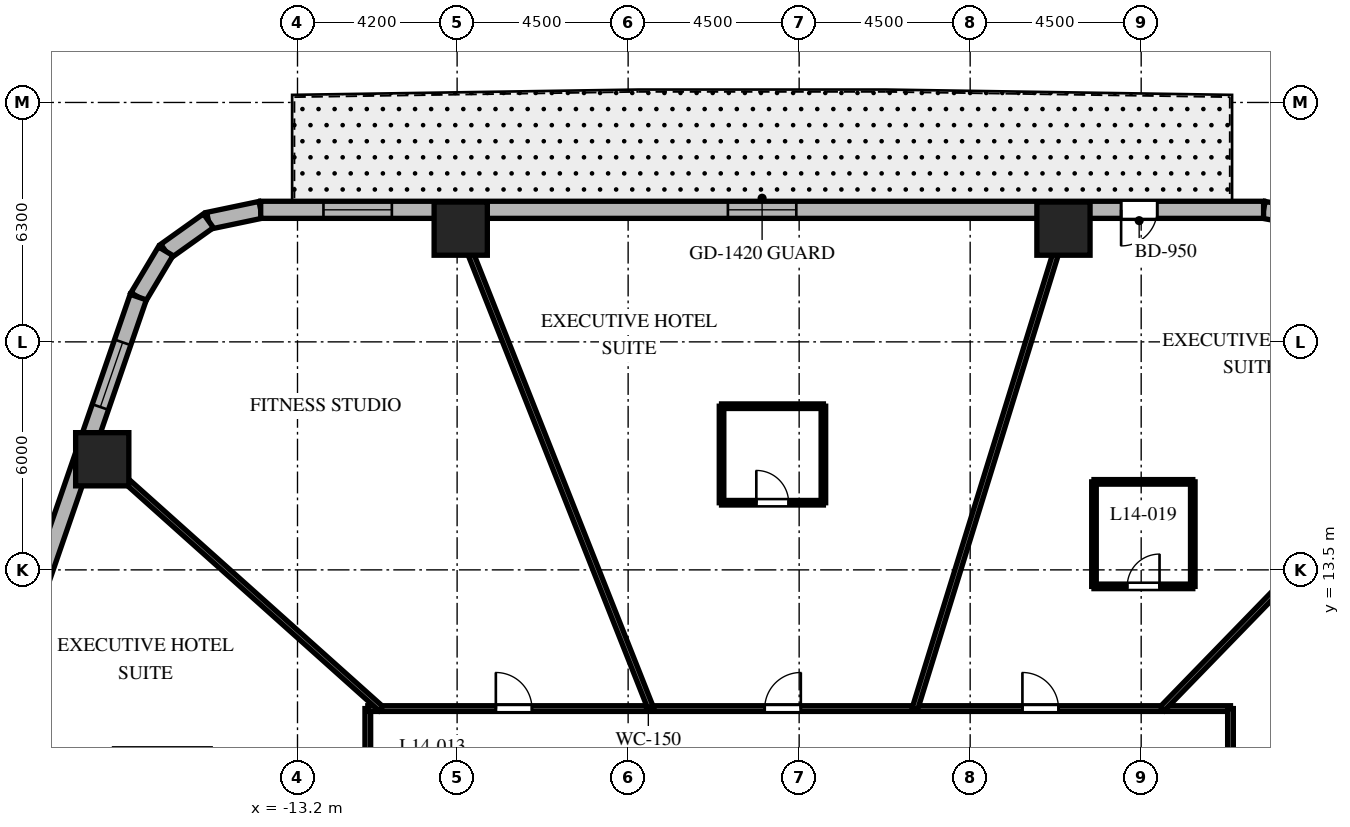
"""IFC4 building model, lengths in metres.
Left out: names, types, materials, properties, quantities, classifications, styles, units other than length and angle.
Written with IfcOpenShell. Run it as: python <this file> out.ifc"""

import sys

from ifc_helpers import new_model, si_unit, direction, frame, frame_2d, origin, origin_2d, place, context, subcontext, project, spatial, rectangle, extrude, element, fill, save


model = new_model("IFC4")
c1 = context("Model", 3, precision=1e-05, world=origin(), true_north=direction((0.0, 1.0)))
c2 = subcontext(c1, "Body", "Model", "MODEL_VIEW")
j1 = project(units=[si_unit("LENGTHUNIT", "METRE"), si_unit("PLANEANGLEUNIT", "RADIAN")], contexts=[c1])
p1 = place(None, origin())
s1 = spatial("IfcSite", under=j1, at=p1, CompositionType="ELEMENT")
p2 = place(p1, origin())
s2 = spatial("IfcBuilding", under=s1, at=p2, CompositionType="ELEMENT")
p3 = place(p2, frame((0.0, 0.0, 63.8)))
s3 = spatial("IfcBuildingStorey", under=s2, at=p3, CompositionType="ELEMENT", Elevation=63.8)
for number, where, z_axis, x_axis in (
    (1, (6.955, 22.48, 0.0), (0.0, 0.0, 1.0), (1.0, 0.0, 0.0)),
    (2, (-8.905, 22.48, 0.0), (0.0, 0.0, 1.0), (1.0, 0.0, 0.0)),
    (3, (-18.338, 16.411, 0.0), (0.0, 0.0, 1.0), (1.0, 0.0, 0.0)),
):
    element("IfcColumn", number, at=place(p3, frame(where, z_axis=z_axis, x_axis=x_axis)), inside=s3, PredefinedType="COLUMN", context=c2, shape_type="SweptSolid", body=[
        extrude(rectangle(XDim=1.4, YDim=1.4, at=origin_2d()), origin(), (0.0, 0.0, 1.0), 3.7),
    ])
p4 = place(p3, frame((13.468, 22.74, 0.0), z_axis=(0.0, 0.0, 1.0), x_axis=(-0.982717174228, 0.185113358451, 0.0)))
e4 = element("IfcWall", 4, at=p4, inside=s3, PredefinedType="SOLIDWALL", context=c2, shape_type="SweptSolid", body=[
    extrude(rectangle(XDim=1.269, YDim=0.45, at=frame_2d((0.634, 0.0))), origin(), (0.0, 0.0, 1.0), 3.4),
])
p5 = place(p3, frame((-14.168, 22.975, 0.0), z_axis=(0.0, 0.0, 1.0), x_axis=(-0.978770371074, -0.204959900243, 0.0)))
e5 = element("IfcWall", 5, at=p5, inside=s3, PredefinedType="SOLIDWALL", context=c2, shape_type="SweptSolid", body=[
    extrude(rectangle(XDim=1.406, YDim=0.45, at=frame_2d((0.703, 0.0))), origin(), (0.0, 0.0, 1.0), 3.4),
])
p6 = place(p3, frame((-15.544, 22.687, 0.0), z_axis=(0.0, 0.0, 1.0), x_axis=(-0.814210854316, -0.580569276412, 0.0)))
e6 = element("IfcWall", 6, at=p6, inside=s3, PredefinedType="SOLIDWALL", context=c2, shape_type="SweptSolid", body=[
    extrude(rectangle(XDim=1.381, YDim=0.45, at=frame_2d((0.691, 0.0))), origin(), (0.0, 0.0, 1.0), 3.4),
])
p7 = place(p3, frame((-16.669, 21.885, 0.0), z_axis=(0.0, 0.0, 1.0), x_axis=(-0.512936712947, -0.858426425799, 0.0)))
e7 = element("IfcWall", 7, at=p7, inside=s3, PredefinedType="SOLIDWALL", context=c2, shape_type="SweptSolid", body=[
    extrude(rectangle(XDim=1.406, YDim=0.45, at=frame_2d((0.703, 0.0))), origin(), (0.0, 0.0, 1.0), 3.4),
])
p8 = place(p3, frame((12.221, 22.975, 0.0), z_axis=(0.0, 0.0, 1.0), x_axis=(-1.0, 0.0, 0.0)))
e8 = element("IfcWall", 8, at=p8, inside=s3, PredefinedType="SOLIDWALL", context=c2, shape_type="SweptSolid", body=[
    extrude(rectangle(XDim=26.389, YDim=0.45, at=frame_2d((13.195, 0.0))), origin(), (0.0, 0.0, 1.0), 3.4),
])
p9 = place(p8, frame((2.799, 0.0, 0.0)))
e9 = element("IfcOpeningElement", 9, at=p9, cuts=e8, PredefinedType="OPENING", context=c2, shape_type="SweptSolid", body=[
    extrude(rectangle(XDim=0.95, YDim=2.15, at=frame_2d((0.475, 1.075))), frame((0.0, 0.235, 0.0), z_axis=(0.0, -1.0, 0.0), x_axis=(1.0, 0.0, 0.0)), (0.0, 0.0, 1.0), 0.47),
])
p10 = place(p8, frame((12.296, 0.0, 0.8)))
e10 = element("IfcOpeningElement", 10, at=p10, cuts=e8, PredefinedType="OPENING", context=c2, shape_type="SweptSolid", body=[
    extrude(rectangle(XDim=1.8, YDim=1.8, at=frame_2d((0.9, 0.9))), frame((0.0, 0.235, 0.0), z_axis=(0.0, -1.0, 0.0), x_axis=(1.0, 0.0, 0.0)), (0.0, 0.0, 1.0), 0.47),
])
p11 = place(p8, frame((22.938, 0.0, 0.8)))
e11 = element("IfcOpeningElement", 11, at=p11, cuts=e8, PredefinedType="OPENING", context=c2, shape_type="SweptSolid", body=[
    extrude(rectangle(XDim=1.8, YDim=1.8, at=frame_2d((0.9, 0.9))), frame((0.0, 0.235, 0.0), z_axis=(0.0, -1.0, 0.0), x_axis=(1.0, 0.0, 0.0)), (0.0, 0.0, 1.0), 0.47),
])
p12 = place(p3, frame((-17.39, 20.678, 0.0), z_axis=(0.0, 0.0, 1.0), x_axis=(-0.326068018294, -0.945346310854, 0.0)))
e12 = element("IfcWall", 12, at=p12, inside=s3, PredefinedType="SOLIDWALL", context=c2, shape_type="SweptSolid", body=[
    extrude(rectangle(XDim=21.793, YDim=0.45, at=frame_2d((10.896, 0.0))), origin(), (0.0, 0.0, 1.0), 3.4),
])
p13 = place(p12, frame((1.26, 0.0, 0.8)))
e13 = element("IfcOpeningElement", 13, at=p13, cuts=e12, PredefinedType="OPENING", context=c2, shape_type="SweptSolid", body=[
    extrude(rectangle(XDim=1.8, YDim=1.8, at=frame_2d((0.9, 0.9))), frame((0.0, 0.235, 0.0), z_axis=(0.0, -1.0, 0.0), x_axis=(1.0, 0.0, 0.0)), (0.0, 0.0, 1.0), 0.47),
])
p14 = place(p12, frame((9.943, 0.0, 0.8)))
e14 = element("IfcOpeningElement", 14, at=p14, cuts=e12, PredefinedType="OPENING", context=c2, shape_type="SweptSolid", body=[
    extrude(rectangle(XDim=1.8, YDim=1.8, at=frame_2d((0.9, 0.9))), frame((0.0, 0.235, 0.0), z_axis=(0.0, -1.0, 0.0), x_axis=(1.0, 0.0, 0.0)), (0.0, 0.0, 1.0), 0.47),
])
p15 = place(p12, frame((18.68, 0.0, 0.8)))
e15 = element("IfcOpeningElement", 15, at=p15, cuts=e12, PredefinedType="OPENING", context=c2, shape_type="SweptSolid", body=[
    extrude(rectangle(XDim=1.8, YDim=1.8, at=frame_2d((0.9, 0.9))), frame((0.0, 0.235, 0.0), z_axis=(0.0, -1.0, 0.0), x_axis=(1.0, 0.0, 0.0)), (0.0, 0.0, 1.0), 0.47),
])
p16 = place(p3, frame((-11.35, -9.85, 0.0), z_axis=(0.0, 0.0, 1.0), x_axis=(0.0, 1.0, 0.0)))
e16 = element("IfcWall", 16, at=p16, inside=s3, PredefinedType="PARTITIONING", context=c2, shape_type="SweptSolid", body=[
    extrude(rectangle(XDim=19.7, YDim=0.15, at=frame_2d((9.85, 0.0))), origin(), (0.0, 0.0, 1.0), 2.84),
])
p17 = place(p16, frame((15.191, 0.0, 0.0)))
e17 = element("IfcOpeningElement", 17, at=p17, cuts=e16, PredefinedType="OPENING", context=c2, shape_type="SweptSolid", body=[
    extrude(rectangle(XDim=0.95, YDim=2.03, at=frame_2d((0.475, 1.015))), frame((0.0, 0.085, 0.0), z_axis=(0.0, -1.0, 0.0), x_axis=(1.0, 0.0, 0.0)), (0.0, 0.0, 1.0), 0.17),
])
p18 = place(p16, frame((8.838, 0.0, 0.0)))
e18 = element("IfcOpeningElement", 18, at=p18, cuts=e16, PredefinedType="OPENING", context=c2, shape_type="SweptSolid", body=[
    extrude(rectangle(XDim=0.95, YDim=2.03, at=frame_2d((0.475, 1.015))), frame((0.0, 0.085, 0.0), z_axis=(0.0, -1.0, 0.0), x_axis=(1.0, 0.0, 0.0)), (0.0, 0.0, 1.0), 0.17),
])
p19 = place(p16, frame((4.704, 0.0, 0.0)))
e19 = element("IfcOpeningElement", 19, at=p19, cuts=e16, PredefinedType="OPENING", context=c2, shape_type="SweptSolid", body=[
    extrude(rectangle(XDim=0.95, YDim=2.03, at=frame_2d((0.475, 1.015))), frame((0.0, 0.085, 0.0), z_axis=(0.0, -1.0, 0.0), x_axis=(1.0, 0.0, 0.0)), (0.0, 0.0, 1.0), 0.17),
])
p20 = place(p16, frame((1.462, 0.0, 0.0)))
e20 = element("IfcOpeningElement", 20, at=p20, cuts=e16, PredefinedType="OPENING", context=c2, shape_type="SweptSolid", body=[
    extrude(rectangle(XDim=0.95, YDim=2.03, at=frame_2d((0.475, 1.015))), frame((0.0, 0.085, 0.0), z_axis=(0.0, -1.0, 0.0), x_axis=(1.0, 0.0, 0.0)), (0.0, 0.0, 1.0), 0.17),
])
p21 = place(p3, frame((-11.35, 9.85, 0.0), z_axis=(0.0, 0.0, 1.0), x_axis=(1.0, 0.0, 0.0)))
e21 = element("IfcWall", 21, at=p21, inside=s3, PredefinedType="PARTITIONING", context=c2, shape_type="SweptSolid", body=[
    extrude(rectangle(XDim=22.7, YDim=0.15, at=frame_2d((11.35, 0.0))), origin(), (0.0, 0.0, 1.0), 2.84),
])
p22 = place(p21, frame((17.225, 0.0, 0.0)))
e22 = element("IfcOpeningElement", 22, at=p22, cuts=e21, PredefinedType="OPENING", context=c2, shape_type="SweptSolid", body=[
    extrude(rectangle(XDim=0.95, YDim=2.03, at=frame_2d((0.475, 1.015))), frame((0.0, 0.085, 0.0), z_axis=(0.0, -1.0, 0.0), x_axis=(1.0, 0.0, 0.0)), (0.0, 0.0, 1.0), 0.17),
])
p23 = place(p21, frame((10.444, 0.0, 0.0)))
e23 = element("IfcOpeningElement", 23, at=p23, cuts=e21, PredefinedType="OPENING", context=c2, shape_type="SweptSolid", body=[
    extrude(rectangle(XDim=0.95, YDim=2.03, at=frame_2d((0.475, 1.015))), frame((0.0, 0.085, 0.0), z_axis=(0.0, -1.0, 0.0), x_axis=(1.0, 0.0, 0.0)), (0.0, 0.0, 1.0), 0.17),
])
p24 = place(p21, frame((3.369, 0.0, 0.0)))
e24 = element("IfcOpeningElement", 24, at=p24, cuts=e21, PredefinedType="OPENING", context=c2, shape_type="SweptSolid", body=[
    extrude(rectangle(XDim=0.95, YDim=2.03, at=frame_2d((0.475, 1.015))), frame((0.0, 0.085, 0.0), z_axis=(0.0, -1.0, 0.0), x_axis=(1.0, 0.0, 0.0)), (0.0, 0.0, 1.0), 0.17),
])
p25 = place(p3, frame((11.35, 9.85, 0.0), z_axis=(0.0, 0.0, 1.0), x_axis=(0.0, -1.0, 0.0)))
e25 = element("IfcWall", 25, at=p25, inside=s3, PredefinedType="PARTITIONING", context=c2, shape_type="SweptSolid", body=[
    extrude(rectangle(XDim=19.7, YDim=0.15, at=frame_2d((9.85, 0.0))), origin(), (0.0, 0.0, 1.0), 2.84),
])
p26 = place(p25, frame((4.704, 0.0, 0.0)))
e26 = element("IfcOpeningElement", 26, at=p26, cuts=e25, PredefinedType="OPENING", context=c2, shape_type="SweptSolid", body=[
    extrude(rectangle(XDim=0.95, YDim=2.03, at=frame_2d((0.475, 1.015))), frame((0.0, 0.085, 0.0), z_axis=(0.0, -1.0, 0.0), x_axis=(1.0, 0.0, 0.0)), (0.0, 0.0, 1.0), 0.17),
])
p27 = place(p25, frame((1.462, 0.0, 0.0)))
e27 = element("IfcOpeningElement", 27, at=p27, cuts=e25, PredefinedType="OPENING", context=c2, shape_type="SweptSolid", body=[
    extrude(rectangle(XDim=0.95, YDim=2.03, at=frame_2d((0.475, 1.015))), frame((0.0, 0.085, 0.0), z_axis=(0.0, -1.0, 0.0), x_axis=(1.0, 0.0, 0.0)), (0.0, 0.0, 1.0), 0.17),
])
p28 = place(p25, frame((15.191, 0.0, 0.0)))
e28 = element("IfcOpeningElement", 28, at=p28, cuts=e25, PredefinedType="OPENING", context=c2, shape_type="SweptSolid", body=[
    extrude(rectangle(XDim=0.95, YDim=2.03, at=frame_2d((0.475, 1.015))), frame((0.0, 0.085, 0.0), z_axis=(0.0, -1.0, 0.0), x_axis=(1.0, 0.0, 0.0)), (0.0, 0.0, 1.0), 0.17),
])
p29 = place(p25, frame((8.838, 0.0, 0.0)))
e29 = element("IfcOpeningElement", 29, at=p29, cuts=e25, PredefinedType="OPENING", context=c2, shape_type="SweptSolid", body=[
    extrude(rectangle(XDim=0.95, YDim=2.03, at=frame_2d((0.475, 1.015))), frame((0.0, 0.085, 0.0), z_axis=(0.0, -1.0, 0.0), x_axis=(1.0, 0.0, 0.0)), (0.0, 0.0, 1.0), 0.17),
])
p30 = place(p3, frame((11.35, 6.217, 0.0), z_axis=(0.0, 0.0, 1.0), x_axis=(0.877047587135, 0.480403507378, 0.0)))
e30 = element("IfcWall", 30, at=p30, inside=s3, PredefinedType="PARTITIONING", context=c2, shape_type="SweptSolid", body=[
    extrude(rectangle(XDim=10.062, YDim=0.15, at=frame_2d((5.031, 0.0))), origin(), (0.0, 0.0, 1.0), 2.54),
])
p31 = place(p3, frame((9.558, 9.85, 0.0), z_axis=(0.0, 0.0, 1.0), x_axis=(0.69638346089, 0.717669893056, 0.0)))
e31 = element("IfcWall", 31, at=p31, inside=s3, PredefinedType="PARTITIONING", context=c2, shape_type="SweptSolid", body=[
    extrude(rectangle(XDim=10.701, YDim=0.15, at=frame_2d((5.351, 0.0))), origin(), (0.0, 0.0, 1.0), 2.54),
])
p32 = place(p3, frame((3.048, 9.85, 0.0), z_axis=(0.0, 0.0, 1.0), x_axis=(0.295553992761, 0.955326037206, 0.0)))
e32 = element("IfcWall", 32, at=p32, inside=s3, PredefinedType="PARTITIONING", context=c2, shape_type="SweptSolid", body=[
    extrude(rectangle(XDim=13.739, YDim=0.15, at=frame_2d((6.869, 0.0))), origin(), (0.0, 0.0, 1.0), 2.54),
])
p33 = place(p3, frame((-3.902, 9.85, 0.0), z_axis=(0.0, 0.0, 1.0), x_axis=(-0.36828765711, 0.929711891728, 0.0)))
e33 = element("IfcWall", 33, at=p33, inside=s3, PredefinedType="PARTITIONING", context=c2, shape_type="SweptSolid", body=[
    extrude(rectangle(XDim=14.117, YDim=0.15, at=frame_2d((7.059, 0.0))), origin(), (0.0, 0.0, 1.0), 2.54),
])
p34 = place(p3, frame((-11.007, 9.85, 0.0), z_axis=(0.0, 0.0, 1.0), x_axis=(-0.745177305978, 0.666866390407, 0.0)))
e34 = element("IfcWall", 34, at=p34, inside=s3, PredefinedType="PARTITIONING", context=c2, shape_type="SweptSolid", body=[
    extrude(rectangle(XDim=10.375, YDim=0.15, at=frame_2d((5.188, 0.0))), origin(), (0.0, 0.0, 1.0), 2.54),
])
p35 = place(p3, frame((7.758, 13.066, 0.0), z_axis=(0.0, 0.0, 1.0), x_axis=(1.0, 0.0, 0.0)))
e35 = element("IfcWall", 35, at=p35, inside=s3, PredefinedType="PARTITIONING", context=c2, shape_type="SweptSolid", body=[
    extrude(rectangle(XDim=2.6, YDim=0.12, at=frame_2d((1.3, 0.0))), origin(), (0.0, 0.0, 1.0), 2.84),
])
p36 = place(p35, frame((0.875, 0.0, 0.0)))
e36 = element("IfcOpeningElement", 36, at=p36, cuts=e35, PredefinedType="OPENING", context=c2, shape_type="SweptSolid", body=[
    extrude(rectangle(XDim=0.85, YDim=2.03, at=frame_2d((0.425, 1.015))), frame((0.0, 0.07, 0.0), z_axis=(0.0, -1.0, 0.0), x_axis=(1.0, 0.0, 0.0)), (0.0, 0.0, 1.0), 0.14),
])
p37 = place(p3, frame((10.358, 13.066, 0.0), z_axis=(0.0, 0.0, 1.0), x_axis=(0.0, 1.0, 0.0)))
e37 = element("IfcWall", 37, at=p37, inside=s3, PredefinedType="PARTITIONING", context=c2, shape_type="SweptSolid", body=[
    extrude(rectangle(XDim=2.75, YDim=0.12, at=frame_2d((1.375, 0.0))), origin(), (0.0, 0.0, 1.0), 3.4),
])
p38 = place(p3, frame((10.358, 15.816, 0.0), z_axis=(0.0, 0.0, 1.0), x_axis=(-1.0, 0.0, 0.0)))
e38 = element("IfcWall", 38, at=p38, inside=s3, PredefinedType="PARTITIONING", context=c2, shape_type="SweptSolid", body=[
    extrude(rectangle(XDim=2.6, YDim=0.12, at=frame_2d((1.3, 0.0))), origin(), (0.0, 0.0, 1.0), 2.84),
])
p39 = place(p3, frame((7.758, 15.816, 0.0), z_axis=(0.0, 0.0, 1.0), x_axis=(0.0, -1.0, 0.0)))
e39 = element("IfcWall", 39, at=p39, inside=s3, PredefinedType="PARTITIONING", context=c2, shape_type="SweptSolid", body=[
    extrude(rectangle(XDim=2.75, YDim=0.12, at=frame_2d((1.375, 0.0))), origin(), (0.0, 0.0, 1.0), 2.84),
])
p40 = place(p3, frame((-2.042, 15.267, 0.0), z_axis=(0.0, 0.0, 1.0), x_axis=(1.0, 0.0, 0.0)))
e40 = element("IfcWall", 40, at=p40, inside=s3, PredefinedType="PARTITIONING", context=c2, shape_type="SweptSolid", body=[
    extrude(rectangle(XDim=2.68, YDim=0.12, at=frame_2d((1.34, 0.0))), origin(), (0.0, 0.0, 1.0), 3.4),
])
p41 = place(p40, frame((0.915, 0.0, 0.0)))
e41 = element("IfcOpeningElement", 41, at=p41, cuts=e40, PredefinedType="OPENING", context=c2, shape_type="SweptSolid", body=[
    extrude(rectangle(XDim=0.85, YDim=2.03, at=frame_2d((0.425, 1.015))), frame((0.0, 0.07, 0.0), z_axis=(0.0, -1.0, 0.0), x_axis=(1.0, 0.0, 0.0)), (0.0, 0.0, 1.0), 0.14),
])
p42 = place(p3, frame((0.638, 15.267, 0.0), z_axis=(0.0, 0.0, 1.0), x_axis=(0.0, 1.0, 0.0)))
e42 = element("IfcWall", 42, at=p42, inside=s3, PredefinedType="PARTITIONING", context=c2, shape_type="SweptSolid", body=[
    extrude(rectangle(XDim=2.54, YDim=0.12, at=frame_2d((1.27, 0.0))), origin(), (0.0, 0.0, 1.0), 2.84),
])
p43 = place(p3, frame((0.638, 17.807, 0.0), z_axis=(0.0, 0.0, 1.0), x_axis=(-1.0, 0.0, 0.0)))
e43 = element("IfcWall", 43, at=p43, inside=s3, PredefinedType="PARTITIONING", context=c2, shape_type="SweptSolid", body=[
    extrude(rectangle(XDim=2.68, YDim=0.12, at=frame_2d((1.34, 0.0))), origin(), (0.0, 0.0, 1.0), 2.84),
])
p44 = place(p3, frame((-2.042, 17.807, 0.0), z_axis=(0.0, 0.0, 1.0), x_axis=(0.0, -1.0, 0.0)))
e44 = element("IfcWall", 44, at=p44, inside=s3, PredefinedType="PARTITIONING", context=c2, shape_type="SweptSolid", body=[
    extrude(rectangle(XDim=2.54, YDim=0.12, at=frame_2d((1.27, 0.0))), origin(), (0.0, 0.0, 1.0), 2.84),
])
p45 = place(p9, origin())
e45 = element("IfcDoor", 45, at=p45, inside=s3, OperationType="SINGLE_SWING_RIGHT", PredefinedType="DOOR", context=c2, shape_type="SweptSolid", body=[
    extrude(rectangle(XDim=0.95, YDim=2.15, at=frame_2d((0.475, 1.075))), frame((0.0, 0.025, 0.0), z_axis=(0.0, -1.0, 0.0), x_axis=(1.0, 0.0, 0.0)), (0.0, 0.0, 1.0), 0.05),
])
fill(e9, e45)
p46 = place(p10, origin())
e46 = element("IfcWindow", 46, at=p46, inside=s3, PartitioningType="SINGLE_PANEL", PredefinedType="WINDOW", context=c2, shape_type="SweptSolid", body=[
    extrude(rectangle(XDim=1.8, YDim=1.8, at=frame_2d((0.9, 0.9))), frame((0.0, 0.03, 0.0), z_axis=(0.0, -1.0, 0.0), x_axis=(1.0, 0.0, 0.0)), (0.0, 0.0, 1.0), 0.06),
])
fill(e10, e46)
p47 = place(p11, origin())
e47 = element("IfcWindow", 47, at=p47, inside=s3, PartitioningType="SINGLE_PANEL", PredefinedType="WINDOW", context=c2, shape_type="SweptSolid", body=[
    extrude(rectangle(XDim=1.8, YDim=1.8, at=frame_2d((0.9, 0.9))), frame((0.0, 0.03, 0.0), z_axis=(0.0, -1.0, 0.0), x_axis=(1.0, 0.0, 0.0)), (0.0, 0.0, 1.0), 0.06),
])
fill(e11, e47)
p48 = place(p13, origin())
e48 = element("IfcWindow", 48, at=p48, inside=s3, PartitioningType="SINGLE_PANEL", PredefinedType="WINDOW", context=c2, shape_type="SweptSolid", body=[
    extrude(rectangle(XDim=1.8, YDim=1.8, at=frame_2d((0.9, 0.9))), frame((0.0, 0.03, 0.0), z_axis=(0.0, -1.0, 0.0), x_axis=(1.0, 0.0, 0.0)), (0.0, 0.0, 1.0), 0.06),
])
fill(e13, e48)
p49 = place(p22, origin())
e49 = element("IfcDoor", 49, at=p49, inside=s3, OperationType="SINGLE_SWING_LEFT", PredefinedType="DOOR", context=c2, shape_type="SweptSolid", body=[
    extrude(rectangle(XDim=0.95, YDim=2.03, at=frame_2d((0.475, 1.015))), frame((0.0, 0.025, 0.0), z_axis=(0.0, -1.0, 0.0), x_axis=(1.0, 0.0, 0.0)), (0.0, 0.0, 1.0), 0.05),
])
fill(e22, e49)
p50 = place(p36, origin())
e50 = element("IfcDoor", 50, at=p50, inside=s3, OperationType="SINGLE_SWING_RIGHT", PredefinedType="DOOR", context=c2, shape_type="SweptSolid", body=[
    extrude(rectangle(XDim=0.85, YDim=2.03, at=frame_2d((0.425, 1.015))), frame((0.0, 0.025, 0.0), z_axis=(0.0, -1.0, 0.0), x_axis=(1.0, 0.0, 0.0)), (0.0, 0.0, 1.0), 0.05),
])
fill(e36, e50)
p51 = place(p23, origin())
e51 = element("IfcDoor", 51, at=p51, inside=s3, OperationType="SINGLE_SWING_RIGHT", PredefinedType="DOOR", context=c2, shape_type="SweptSolid", body=[
    extrude(rectangle(XDim=0.95, YDim=2.03, at=frame_2d((0.475, 1.015))), frame((0.0, 0.025, 0.0), z_axis=(0.0, -1.0, 0.0), x_axis=(1.0, 0.0, 0.0)), (0.0, 0.0, 1.0), 0.05),
])
fill(e23, e51)
p52 = place(p41, origin())
e52 = element("IfcDoor", 52, at=p52, inside=s3, OperationType="SINGLE_SWING_LEFT", PredefinedType="DOOR", context=c2, shape_type="SweptSolid", body=[
    extrude(rectangle(XDim=0.85, YDim=2.03, at=frame_2d((0.425, 1.015))), frame((0.0, 0.025, 0.0), z_axis=(0.0, -1.0, 0.0), x_axis=(1.0, 0.0, 0.0)), (0.0, 0.0, 1.0), 0.05),
])
fill(e41, e52)
p53 = place(p24, origin())
e53 = element("IfcDoor", 53, at=p53, inside=s3, OperationType="SINGLE_SWING_LEFT", PredefinedType="DOOR", context=c2, shape_type="SweptSolid", body=[
    extrude(rectangle(XDim=0.95, YDim=2.03, at=frame_2d((0.475, 1.015))), frame((0.0, 0.025, 0.0), z_axis=(0.0, -1.0, 0.0), x_axis=(1.0, 0.0, 0.0)), (0.0, 0.0, 1.0), 0.05),
])
fill(e24, e53)
save(model, sys.argv[1])
